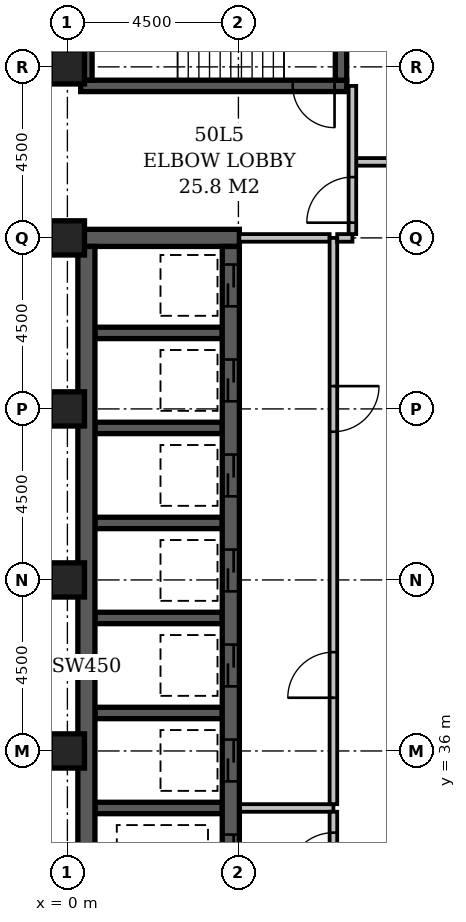
"""IFC4 building model, lengths in metres.
Left out: names, types, materials, properties, quantities, classifications, styles, units other than length and angle.
Written with IfcOpenShell. Run it as: python <this file> out.ifc"""

import sys

from ifc_helpers import new_model, si_unit, direction, frame, frame_2d, origin, origin_2d, place, context, subcontext, project, spatial, rectangle, extrude, element, fill, save


model = new_model("IFC4")
c1 = context("Model", 3, precision=1e-05, world=origin(), true_north=direction((0.0, 1.0)))
c2 = subcontext(c1, "Body", "Model", "MODEL_VIEW")
j1 = project(units=[si_unit("LENGTHUNIT", "METRE"), si_unit("PLANEANGLEUNIT", "RADIAN")], contexts=[c1])
p1 = place(None, origin())
s1 = spatial("IfcSite", under=j1, at=p1, CompositionType="ELEMENT")
p2 = place(p1, origin())
s2 = spatial("IfcBuilding", under=s1, at=p2, CompositionType="ELEMENT")
p3 = place(p2, frame((0.0, 0.0, 197.0)))
s3 = spatial("IfcBuildingStorey", under=s2, at=p3, CompositionType="ELEMENT", Elevation=197.0)
p4 = place(p3, frame((0.275, 49.5, -0.3), z_axis=(0.0, 0.0, 1.0), x_axis=(1.0, 0.0, 0.0)))
e1 = element("IfcWall", 1, at=p4, inside=s3, PredefinedType="SHEAR", context=c2, shape_type="SweptSolid", body=[
    extrude(rectangle(XDim=4.25, YDim=0.45, at=frame_2d((2.125, 0.0))), origin(), (0.0, 0.0, 1.0), 3.6),
])
p5 = place(p3, frame((0.35, 53.5, -0.3), z_axis=(0.0, 0.0, 1.0), x_axis=(1.0, 0.0, 0.0)))
e2 = element("IfcWall", 2, at=p5, inside=s3, PredefinedType="SHEAR", context=c2, shape_type="SweptSolid", body=[
    extrude(rectangle(XDim=7.0, YDim=0.3, at=frame_2d((3.5, 0.0))), origin(), (0.0, 0.0, 1.0), 3.6),
])
p6 = place(p5, frame((5.58, 0.0, 0.3)))
e3 = element("IfcOpeningElement", 3, at=p6, cuts=e2, PredefinedType="OPENING", context=c2, shape_type="SweptSolid", body=[
    extrude(rectangle(XDim=1.1, YDim=2.1, at=frame_2d((0.55, 1.05))), frame((0.0, 0.162, 0.0), z_axis=(0.0, -1.0, 0.0), x_axis=(1.0, 0.0, 0.0)), (0.0, 0.0, 1.0), 0.324),
])
p7 = place(p3, frame((0.5, 27.15, -0.3), z_axis=(0.0, 0.0, 1.0), x_axis=(0.0, 1.0, 0.0)))
e4 = element("IfcWall", 4, at=p7, inside=s3, PredefinedType="SHEAR", context=c2, shape_type="SweptSolid", body=[
    extrude(rectangle(XDim=22.125, YDim=0.45, at=frame_2d((11.062, 0.0))), origin(), (0.0, 0.0, 1.0), 3.6),
])
p8 = place(p3, frame((0.5, 53.65, -0.3), z_axis=(0.0, 0.0, 1.0), x_axis=(0.0, 1.0, 0.0)))
e5 = element("IfcWall", 5, at=p8, inside=s3, PredefinedType="SHEAR", context=c2, shape_type="SweptSolid", body=[
    extrude(rectangle(XDim=4.2, YDim=0.3, at=frame_2d((2.1, 0.0))), origin(), (0.0, 0.0, 1.0), 3.6),
])
for number, where, z_axis, x_axis in (
    (6, (0.725, 34.5, -0.3), (0.0, 0.0, 1.0), (1.0, 0.0, 0.0)),
    (7, (0.725, 37.0, -0.3), (0.0, 0.0, 1.0), (1.0, 0.0, 0.0)),
    (8, (0.725, 39.5, -0.3), (0.0, 0.0, 1.0), (1.0, 0.0, 0.0)),
    (9, (0.725, 42.0, -0.3), (0.0, 0.0, 1.0), (1.0, 0.0, 0.0)),
    (10, (0.725, 44.5, -0.3), (0.0, 0.0, 1.0), (1.0, 0.0, 0.0)),
    (11, (0.725, 47.0, -0.3), (0.0, 0.0, 1.0), (1.0, 0.0, 0.0)),
):
    element("IfcWall", number, at=place(p3, frame(where, z_axis=z_axis, x_axis=x_axis)), inside=s3, PredefinedType="SHEAR", context=c2, shape_type="SweptSolid", body=[
        extrude(rectangle(XDim=3.35, YDim=0.3, at=frame_2d((1.675, 0.0))), origin(), (0.0, 0.0, 1.0), 3.6),
    ])
p9 = place(p3, frame((4.3, 27.15, -0.3), z_axis=(0.0, 0.0, 1.0), x_axis=(0.0, 1.0, 0.0)))
e12 = element("IfcWall", 12, at=p9, inside=s3, PredefinedType="SHEAR", context=c2, shape_type="SweptSolid", body=[
    extrude(rectangle(XDim=22.125, YDim=0.45, at=frame_2d((11.062, 0.0))), origin(), (0.0, 0.0, 1.0), 3.6),
])
p10 = place(p9, frame((3.05, 0.0, 0.3)))
e13 = element("IfcOpeningElement", 13, at=p10, cuts=e12, PredefinedType="OPENING", context=c2, shape_type="SweptSolid", body=[
    extrude(rectangle(XDim=1.1, YDim=2.1, at=frame_2d((0.55, 1.05))), frame((0.0, 0.237, 0.0), z_axis=(0.0, -1.0, 0.0), x_axis=(1.0, 0.0, 0.0)), (0.0, 0.0, 1.0), 0.474),
])
p11 = place(p9, frame((0.55, 0.0, 0.3)))
e14 = element("IfcOpeningElement", 14, at=p11, cuts=e12, PredefinedType="OPENING", context=c2, shape_type="SweptSolid", body=[
    extrude(rectangle(XDim=1.1, YDim=2.1, at=frame_2d((0.55, 1.05))), frame((0.0, 0.237, 0.0), z_axis=(0.0, -1.0, 0.0), x_axis=(1.0, 0.0, 0.0)), (0.0, 0.0, 1.0), 0.474),
])
p12 = place(p9, frame((20.55, 0.0, 0.3)))
e15 = element("IfcOpeningElement", 15, at=p12, cuts=e12, PredefinedType="OPENING", context=c2, shape_type="SweptSolid", body=[
    extrude(rectangle(XDim=1.1, YDim=2.1, at=frame_2d((0.55, 1.05))), frame((0.0, 0.237, 0.0), z_axis=(0.0, -1.0, 0.0), x_axis=(1.0, 0.0, 0.0)), (0.0, 0.0, 1.0), 0.474),
])
p13 = place(p9, frame((18.05, 0.0, 0.3)))
e16 = element("IfcOpeningElement", 16, at=p13, cuts=e12, PredefinedType="OPENING", context=c2, shape_type="SweptSolid", body=[
    extrude(rectangle(XDim=1.1, YDim=2.1, at=frame_2d((0.55, 1.05))), frame((0.0, 0.237, 0.0), z_axis=(0.0, -1.0, 0.0), x_axis=(1.0, 0.0, 0.0)), (0.0, 0.0, 1.0), 0.474),
])
p14 = place(p9, frame((15.55, 0.0, 0.3)))
e17 = element("IfcOpeningElement", 17, at=p14, cuts=e12, PredefinedType="OPENING", context=c2, shape_type="SweptSolid", body=[
    extrude(rectangle(XDim=1.1, YDim=2.1, at=frame_2d((0.55, 1.05))), frame((0.0, 0.237, 0.0), z_axis=(0.0, -1.0, 0.0), x_axis=(1.0, 0.0, 0.0)), (0.0, 0.0, 1.0), 0.474),
])
p15 = place(p9, frame((13.05, 0.0, 0.3)))
e18 = element("IfcOpeningElement", 18, at=p15, cuts=e12, PredefinedType="OPENING", context=c2, shape_type="SweptSolid", body=[
    extrude(rectangle(XDim=1.1, YDim=2.1, at=frame_2d((0.55, 1.05))), frame((0.0, 0.237, 0.0), z_axis=(0.0, -1.0, 0.0), x_axis=(1.0, 0.0, 0.0)), (0.0, 0.0, 1.0), 0.474),
])
p16 = place(p9, frame((10.55, 0.0, 0.3)))
e19 = element("IfcOpeningElement", 19, at=p16, cuts=e12, PredefinedType="OPENING", context=c2, shape_type="SweptSolid", body=[
    extrude(rectangle(XDim=1.1, YDim=2.1, at=frame_2d((0.55, 1.05))), frame((0.0, 0.237, 0.0), z_axis=(0.0, -1.0, 0.0), x_axis=(1.0, 0.0, 0.0)), (0.0, 0.0, 1.0), 0.474),
])
p17 = place(p9, frame((8.05, 0.0, 0.3)))
e20 = element("IfcOpeningElement", 20, at=p17, cuts=e12, PredefinedType="OPENING", context=c2, shape_type="SweptSolid", body=[
    extrude(rectangle(XDim=1.1, YDim=2.1, at=frame_2d((0.55, 1.05))), frame((0.0, 0.237, 0.0), z_axis=(0.0, -1.0, 0.0), x_axis=(1.0, 0.0, 0.0)), (0.0, 0.0, 1.0), 0.474),
])
p18 = place(p9, frame((5.55, 0.0, 0.3)))
e21 = element("IfcOpeningElement", 21, at=p18, cuts=e12, PredefinedType="OPENING", context=c2, shape_type="SweptSolid", body=[
    extrude(rectangle(XDim=1.1, YDim=2.1, at=frame_2d((0.55, 1.05))), frame((0.0, 0.237, 0.0), z_axis=(0.0, -1.0, 0.0), x_axis=(1.0, 0.0, 0.0)), (0.0, 0.0, 1.0), 0.474),
])
p19 = place(p3, frame((7.2, 53.65, -0.3), z_axis=(0.0, 0.0, 1.0), x_axis=(0.0, 1.0, 0.0)))
e22 = element("IfcWall", 22, at=p19, inside=s3, PredefinedType="SHEAR", context=c2, shape_type="SweptSolid", body=[
    extrude(rectangle(XDim=4.2, YDim=0.3, at=frame_2d((2.1, 0.0))), origin(), (0.0, 0.0, 1.0), 3.6),
])
for number, where, z_axis, x_axis in (
    (23, (0.0, 36.0, -0.3), (0.0, 0.0, 1.0), (1.0, 0.0, 0.0)),
    (24, (0.0, 40.5, -0.3), (0.0, 0.0, 1.0), (1.0, 0.0, 0.0)),
    (25, (0.0, 45.0, -0.3), (0.0, 0.0, 1.0), (1.0, 0.0, 0.0)),
    (26, (0.0, 49.5, -0.3), (0.0, 0.0, 1.0), (1.0, 0.0, 0.0)),
    (27, (0.0, 54.0, -0.3), (0.0, 0.0, 1.0), (1.0, 0.0, 0.0)),
):
    element("IfcColumn", number, at=place(p3, frame(where, z_axis=z_axis, x_axis=x_axis)), inside=s3, PredefinedType="COLUMN", context=c2, shape_type="SweptSolid", body=[
        extrude(rectangle(XDim=0.9, YDim=0.9, at=origin_2d()), origin(), (0.0, 0.0, 1.0), 3.6),
    ])
p20 = place(p3, frame((4.545, 34.5, 0.0), z_axis=(0.0, 0.0, 1.0), x_axis=(1.0, 0.0, 0.0)))
e28 = element("IfcWall", 28, at=p20, inside=s3, PredefinedType="PARTITIONING", context=c2, shape_type="SweptSolid", body=[
    extrude(rectangle(XDim=2.455, YDim=0.2, at=frame_2d((1.228, 0.0))), origin(), (0.0, 0.0, 1.0), 3.3),
])
p21 = place(p3, frame((7.0, 34.6, 0.0), z_axis=(0.0, 0.0, 1.0), x_axis=(0.0, 1.0, 0.0)))
e29 = element("IfcWall", 29, at=p21, inside=s3, PredefinedType="PARTITIONING", context=c2, shape_type="SweptSolid", body=[
    extrude(rectangle(XDim=14.9, YDim=0.2, at=frame_2d((7.45, 0.0))), origin(), (0.0, 0.0, 1.0), 3.3),
])
p22 = place(p21, frame((2.8, 0.0, 0.0)))
e30 = element("IfcOpeningElement", 30, at=p22, cuts=e29, PredefinedType="OPENING", context=c2, shape_type="SweptSolid", body=[
    extrude(rectangle(XDim=1.2, YDim=2.1, at=frame_2d((0.6, 1.05))), frame((0.0, 0.112, 0.0), z_axis=(0.0, -1.0, 0.0), x_axis=(1.0, 0.0, 0.0)), (0.0, 0.0, 1.0), 0.224),
])
p23 = place(p21, frame((9.8, 0.0, 0.0)))
e31 = element("IfcOpeningElement", 31, at=p23, cuts=e29, PredefinedType="OPENING", context=c2, shape_type="SweptSolid", body=[
    extrude(rectangle(XDim=1.2, YDim=2.1, at=frame_2d((0.6, 1.05))), frame((0.0, 0.112, 0.0), z_axis=(0.0, -1.0, 0.0), x_axis=(1.0, 0.0, 0.0)), (0.0, 0.0, 1.0), 0.224),
])
p24 = place(p3, frame((4.525, 49.5, 0.0), z_axis=(0.0, 0.0, 1.0), x_axis=(1.0, 0.0, 0.0)))
e32 = element("IfcWall", 32, at=p24, inside=s3, PredefinedType="PARTITIONING", context=c2, shape_type="SweptSolid", body=[
    extrude(rectangle(XDim=2.375, YDim=0.2, at=frame_2d((1.188, 0.0))), origin(), (0.0, 0.0, 1.0), 3.3),
])
p25 = place(p3, frame((7.0, 32.1, 0.0), z_axis=(0.0, 0.0, 1.0), x_axis=(0.0, 1.0, 0.0)))
e33 = element("IfcWall", 33, at=p25, inside=s3, PredefinedType="PARTITIONING", context=c2, shape_type="SweptSolid", body=[
    extrude(rectangle(XDim=2.3, YDim=0.2, at=frame_2d((1.15, 0.0))), origin(), (0.0, 0.0, 1.0), 3.3),
])
p26 = place(p25, frame((0.55, 0.0, 0.0)))
e34 = element("IfcOpeningElement", 34, at=p26, cuts=e33, PredefinedType="OPENING", context=c2, shape_type="SweptSolid", body=[
    extrude(rectangle(XDim=1.2, YDim=2.1, at=frame_2d((0.6, 1.05))), frame((0.0, 0.112, 0.0), z_axis=(0.0, -1.0, 0.0), x_axis=(1.0, 0.0, 0.0)), (0.0, 0.0, 1.0), 0.224),
])
p27 = place(p3, frame((7.1, 49.5, 0.0), z_axis=(0.0, 0.0, 1.0), x_axis=(1.0, 0.0, 0.0)))
e35 = element("IfcWall", 35, at=p27, inside=s3, PredefinedType="PARTITIONING", context=c2, shape_type="SweptSolid", body=[
    extrude(rectangle(XDim=0.4, YDim=0.2, at=frame_2d((0.2, 0.0))), origin(), (0.0, 0.0, 1.0), 3.3),
])
p28 = place(p3, frame((7.5, 49.6, 0.0), z_axis=(0.0, 0.0, 1.0), x_axis=(0.0, 1.0, 0.0)))
e36 = element("IfcWall", 36, at=p28, inside=s3, PredefinedType="PARTITIONING", context=c2, shape_type="SweptSolid", body=[
    extrude(rectangle(XDim=3.9, YDim=0.2, at=frame_2d((1.95, 0.0))), origin(), (0.0, 0.0, 1.0), 3.3),
])
p29 = place(p28, frame((0.3, 0.0, 0.0)))
e37 = element("IfcOpeningElement", 37, at=p29, cuts=e36, PredefinedType="OPENING", context=c2, shape_type="SweptSolid", body=[
    extrude(rectangle(XDim=1.2, YDim=2.1, at=frame_2d((0.6, 1.05))), frame((0.0, 0.112, 0.0), z_axis=(0.0, -1.0, 0.0), x_axis=(1.0, 0.0, 0.0)), (0.0, 0.0, 1.0), 0.224),
])
p30 = place(p3, frame((7.6, 51.5, 0.0), z_axis=(0.0, 0.0, 1.0), x_axis=(1.0, 0.0, 0.0)))
e38 = element("IfcWall", 38, at=p30, inside=s3, PredefinedType="PARTITIONING", context=c2, shape_type="SweptSolid", body=[
    extrude(rectangle(XDim=15.3, YDim=0.2, at=frame_2d((7.65, 0.0))), origin(), (0.0, 0.0, 1.0), 3.3),
])
p31 = place(p30, frame((3.55, 0.0, 0.0)))
e39 = element("IfcOpeningElement", 39, at=p31, cuts=e38, PredefinedType="OPENING", context=c2, shape_type="SweptSolid", body=[
    extrude(rectangle(XDim=0.9, YDim=2.1, at=frame_2d((0.45, 1.05))), frame((0.0, 0.112, 0.0), z_axis=(0.0, -1.0, 0.0), x_axis=(1.0, 0.0, 0.0)), (0.0, 0.0, 1.0), 0.224),
])
p32 = place(p30, frame((11.3, 0.0, 0.0)))
e40 = element("IfcOpeningElement", 40, at=p32, cuts=e38, PredefinedType="OPENING", context=c2, shape_type="SweptSolid", body=[
    extrude(rectangle(XDim=0.9, YDim=2.1, at=frame_2d((0.45, 1.05))), frame((0.0, 0.112, 0.0), z_axis=(0.0, -1.0, 0.0), x_axis=(1.0, 0.0, 0.0)), (0.0, 0.0, 1.0), 0.224),
])
p33 = place(p29, origin())
e41 = element("IfcDoor", 41, at=p33, inside=s3, OperationType="SINGLE_SWING_LEFT", PredefinedType="DOOR", context=c2, shape_type="SweptSolid", body=[
    extrude(rectangle(XDim=1.2, YDim=2.1, at=frame_2d((0.6, 1.05))), frame((0.0, 0.025, 0.0), z_axis=(0.0, -1.0, 0.0), x_axis=(1.0, 0.0, 0.0)), (0.0, 0.0, 1.0), 0.05),
])
fill(e37, e41)
p34 = place(p12, origin())
e42 = element("IfcDoor", 42, at=p34, inside=s3, OperationType="SLIDING_TO_LEFT", PredefinedType="DOOR", context=c2, shape_type="SweptSolid", body=[
    extrude(rectangle(XDim=1.1, YDim=2.1, at=frame_2d((0.55, 1.05))), frame((0.0, 0.025, 0.0), z_axis=(0.0, -1.0, 0.0), x_axis=(1.0, 0.0, 0.0)), (0.0, 0.0, 1.0), 0.05),
])
fill(e15, e42)
p35 = place(p13, origin())
e43 = element("IfcDoor", 43, at=p35, inside=s3, OperationType="SLIDING_TO_LEFT", PredefinedType="DOOR", context=c2, shape_type="SweptSolid", body=[
    extrude(rectangle(XDim=1.1, YDim=2.1, at=frame_2d((0.55, 1.05))), frame((0.0, 0.025, 0.0), z_axis=(0.0, -1.0, 0.0), x_axis=(1.0, 0.0, 0.0)), (0.0, 0.0, 1.0), 0.05),
])
fill(e16, e43)
p36 = place(p14, origin())
e44 = element("IfcDoor", 44, at=p36, inside=s3, OperationType="SLIDING_TO_LEFT", PredefinedType="DOOR", context=c2, shape_type="SweptSolid", body=[
    extrude(rectangle(XDim=1.1, YDim=2.1, at=frame_2d((0.55, 1.05))), frame((0.0, 0.025, 0.0), z_axis=(0.0, -1.0, 0.0), x_axis=(1.0, 0.0, 0.0)), (0.0, 0.0, 1.0), 0.05),
])
fill(e17, e44)
p37 = place(p15, origin())
e45 = element("IfcDoor", 45, at=p37, inside=s3, OperationType="SLIDING_TO_LEFT", PredefinedType="DOOR", context=c2, shape_type="SweptSolid", body=[
    extrude(rectangle(XDim=1.1, YDim=2.1, at=frame_2d((0.55, 1.05))), frame((0.0, 0.025, 0.0), z_axis=(0.0, -1.0, 0.0), x_axis=(1.0, 0.0, 0.0)), (0.0, 0.0, 1.0), 0.05),
])
fill(e18, e45)
p38 = place(p16, origin())
e46 = element("IfcDoor", 46, at=p38, inside=s3, OperationType="SLIDING_TO_LEFT", PredefinedType="DOOR", context=c2, shape_type="SweptSolid", body=[
    extrude(rectangle(XDim=1.1, YDim=2.1, at=frame_2d((0.55, 1.05))), frame((0.0, 0.025, 0.0), z_axis=(0.0, -1.0, 0.0), x_axis=(1.0, 0.0, 0.0)), (0.0, 0.0, 1.0), 0.05),
])
fill(e19, e46)
p39 = place(p17, origin())
e47 = element("IfcDoor", 47, at=p39, inside=s3, OperationType="SLIDING_TO_LEFT", PredefinedType="DOOR", context=c2, shape_type="SweptSolid", body=[
    extrude(rectangle(XDim=1.1, YDim=2.1, at=frame_2d((0.55, 1.05))), frame((0.0, 0.025, 0.0), z_axis=(0.0, -1.0, 0.0), x_axis=(1.0, 0.0, 0.0)), (0.0, 0.0, 1.0), 0.05),
])
fill(e20, e47)
p40 = place(p22, origin())
e48 = element("IfcDoor", 48, at=p40, inside=s3, OperationType="SINGLE_SWING_LEFT", PredefinedType="DOOR", context=c2, shape_type="SweptSolid", body=[
    extrude(rectangle(XDim=1.2, YDim=2.1, at=frame_2d((0.6, 1.05))), frame((0.0, 0.025, 0.0), z_axis=(0.0, -1.0, 0.0), x_axis=(1.0, 0.0, 0.0)), (0.0, 0.0, 1.0), 0.05),
])
fill(e30, e48)
p41 = place(p23, origin())
e49 = element("IfcDoor", 49, at=p41, inside=s3, OperationType="SINGLE_SWING_RIGHT", PredefinedType="DOOR", context=c2, shape_type="SweptSolid", body=[
    extrude(rectangle(XDim=1.2, YDim=2.1, at=frame_2d((0.6, 1.05))), frame((0.0, 0.025, 0.0), z_axis=(0.0, -1.0, 0.0), x_axis=(1.0, 0.0, 0.0)), (0.0, 0.0, 1.0), 0.05),
])
fill(e31, e49)
p42 = place(p26, origin())
e50 = element("IfcDoor", 50, at=p42, inside=s3, OperationType="SINGLE_SWING_LEFT", PredefinedType="DOOR", context=c2, shape_type="SweptSolid", body=[
    extrude(rectangle(XDim=1.2, YDim=2.1, at=frame_2d((0.6, 1.05))), frame((0.0, 0.025, 0.0), z_axis=(0.0, -1.0, 0.0), x_axis=(1.0, 0.0, 0.0)), (0.0, 0.0, 1.0), 0.05),
])
fill(e34, e50)
p43 = place(p18, origin())
e51 = element("IfcDoor", 51, at=p43, inside=s3, OperationType="SLIDING_TO_LEFT", PredefinedType="DOOR", context=c2, shape_type="SweptSolid", body=[
    extrude(rectangle(XDim=1.1, YDim=2.1, at=frame_2d((0.55, 1.05))), frame((0.0, 0.025, 0.0), z_axis=(0.0, -1.0, 0.0), x_axis=(1.0, 0.0, 0.0)), (0.0, 0.0, 1.0), 0.05),
])
fill(e21, e51)
p44 = place(p6, origin())
e52 = element("IfcDoor", 52, at=p44, inside=s3, OperationType="SINGLE_SWING_RIGHT", PredefinedType="DOOR", context=c2, shape_type="SweptSolid", body=[
    extrude(rectangle(XDim=1.1, YDim=2.1, at=frame_2d((0.55, 1.05))), frame((0.0, 0.025, 0.0), z_axis=(0.0, -1.0, 0.0), x_axis=(1.0, 0.0, 0.0)), (0.0, 0.0, 1.0), 0.05),
])
fill(e3, e52)
save(model, sys.argv[1])
